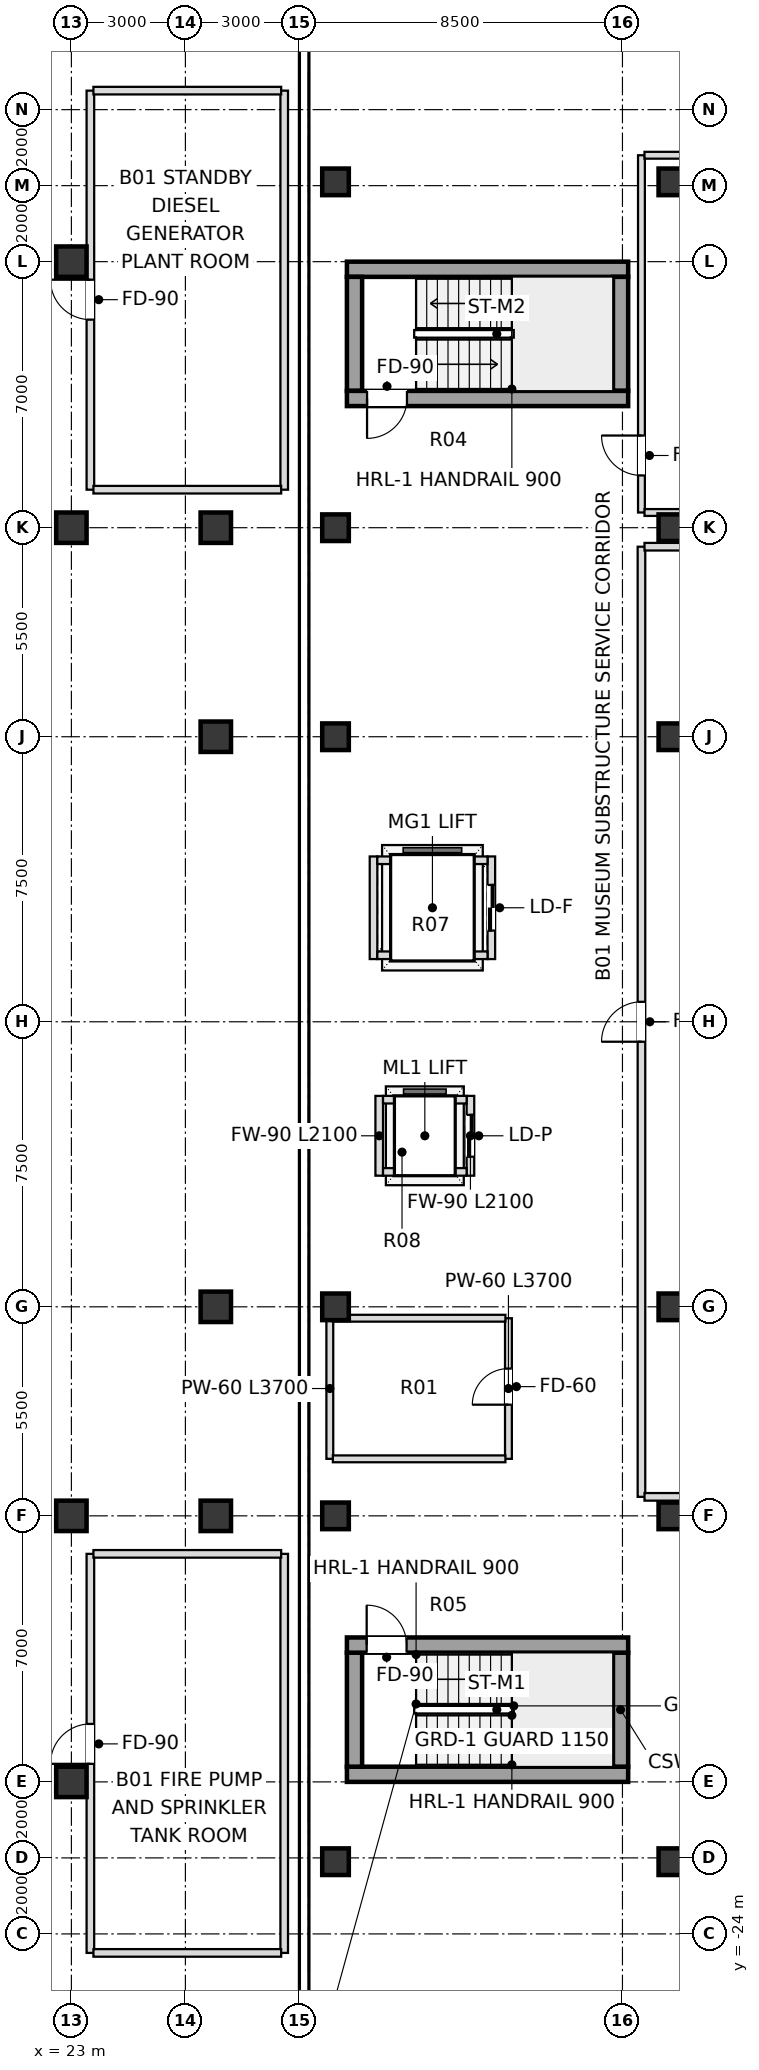
"""IFC4 building model, lengths in metres.
Left out: names, types, materials, properties, quantities, classifications, styles, units other than length and angle.
Written with IfcOpenShell. Run it as: python <this file> out.ifc"""

import sys

from ifc_helpers import new_model, si_unit, direction, frame, frame_2d, origin, origin_2d, place, context, subcontext, project, spatial, rectangle, extrude, element, fill, save


model = new_model("IFC4")
c1 = context("Model", 3, precision=1e-05, world=origin(), true_north=direction((0.0, 1.0)))
c2 = subcontext(c1, "Body", "Model", "MODEL_VIEW")
j1 = project(units=[si_unit("LENGTHUNIT", "METRE"), si_unit("PLANEANGLEUNIT", "RADIAN")], contexts=[c1])
p1 = place(None, origin())
s1 = spatial("IfcSite", under=j1, at=p1, CompositionType="ELEMENT")
p2 = place(p1, origin())
s2 = spatial("IfcBuilding", under=s1, at=p2, CompositionType="ELEMENT")
p3 = place(p2, frame((0.0, 0.0, -3.6)))
s3 = spatial("IfcBuildingStorey", under=s2, at=p3, CompositionType="ELEMENT", Elevation=-3.6)
for number, where, z_axis, x_axis in (
    (1, (23.0, -20.0, 0.0), (0.0, 0.0, 1.0), (1.0, 0.0, 0.0)),
    (2, (23.0, -13.0, 0.0), (0.0, 0.0, 1.0), (1.0, 0.0, 0.0)),
    (3, (23.0, 13.0, 0.0), (0.0, 0.0, 1.0), (1.0, 0.0, 0.0)),
    (4, (23.0, 20.0, 0.0), (0.0, 0.0, 1.0), (1.0, 0.0, 0.0)),
    (5, (26.8, -13.0, 0.0), (0.0, 0.0, 1.0), (1.0, 0.0, 0.0)),
    (6, (26.8, -7.5, 0.0), (0.0, 0.0, 1.0), (1.0, 0.0, 0.0)),
    (7, (26.8, 7.5, 0.0), (0.0, 0.0, 1.0), (1.0, 0.0, 0.0)),
    (8, (26.8, 13.0, 0.0), (0.0, 0.0, 1.0), (1.0, 0.0, 0.0)),
):
    element("IfcColumn", number, at=place(p3, frame(where, z_axis=z_axis, x_axis=x_axis)), inside=s3, PredefinedType="COLUMN", context=c2, shape_type="SweptSolid", body=[
        extrude(rectangle(XDim=0.8, YDim=0.8, at=origin_2d()), origin(), (0.0, 0.0, 1.0), 3.6),
    ])
for number, where, z_axis, x_axis in (
    (9, (29.95, -22.1, 0.0), (0.0, 0.0, 1.0), (1.0, 0.0, 0.0)),
    (10, (29.95, -13.0, 0.0), (0.0, 0.0, 1.0), (1.0, 0.0, 0.0)),
    (11, (29.95, -7.5, 0.0), (0.0, 0.0, 1.0), (1.0, 0.0, 0.0)),
    (12, (29.95, 7.5, 0.0), (0.0, 0.0, 1.0), (1.0, 0.0, 0.0)),
    (13, (29.95, 13.0, 0.0), (0.0, 0.0, 1.0), (1.0, 0.0, 0.0)),
    (14, (29.95, 22.1, 0.0), (0.0, 0.0, 1.0), (1.0, 0.0, 0.0)),
    (15, (38.8, -22.1, 0.0), (0.0, 0.0, 1.0), (1.0, 0.0, 0.0)),
    (16, (38.8, -13.0, 0.0), (0.0, 0.0, 1.0), (1.0, 0.0, 0.0)),
    (17, (38.8, -7.5, 0.0), (0.0, 0.0, 1.0), (1.0, 0.0, 0.0)),
    (18, (38.8, 7.5, 0.0), (0.0, 0.0, 1.0), (1.0, 0.0, 0.0)),
    (19, (38.8, 13.0, 0.0), (0.0, 0.0, 1.0), (1.0, 0.0, 0.0)),
    (20, (38.8, 22.1, 0.0), (0.0, 0.0, 1.0), (1.0, 0.0, 0.0)),
):
    element("IfcColumn", number, at=place(p3, frame(where, z_axis=z_axis, x_axis=x_axis)), inside=s3, PredefinedType="COLUMN", context=c2, shape_type="SweptSolid", body=[
        extrude(rectangle(XDim=0.7, YDim=0.7, at=origin_2d()), origin(), (0.0, 0.0, 1.0), 3.6),
    ])
p4 = place(p3, frame((37.65, -19.8, 0.0), z_axis=(0.0, 0.0, 1.0), x_axis=(-1.0, 0.0, 0.0)))
e21 = element("IfcWall", 21, at=p4, inside=s3, PredefinedType="SHEAR", context=c2, shape_type="SweptSolid", body=[
    extrude(rectangle(XDim=7.4, YDim=0.4, at=frame_2d((3.7, 0.0))), origin(), (0.0, 0.0, 1.0), 3.25),
])
for number, where, z_axis, x_axis in (
    (22, (37.45, -19.6, 0.0), (0.0, 0.0, 1.0), (0.0, 1.0, 0.0)),
    (23, (30.45, -19.6, 0.0), (0.0, 0.0, 1.0), (0.0, 1.0, 0.0)),
):
    element("IfcWall", number, at=place(p3, frame(where, z_axis=z_axis, x_axis=x_axis)), inside=s3, PredefinedType="SHEAR", context=c2, shape_type="SweptSolid", body=[
        extrude(rectangle(XDim=3.0, YDim=0.4, at=frame_2d((1.5, 0.0))), origin(), (0.0, 0.0, 1.0), 3.25),
    ])
p5 = place(p3, frame((30.25, -16.4, 0.0), z_axis=(0.0, 0.0, 1.0), x_axis=(1.0, 0.0, 0.0)))
e24 = element("IfcWall", 24, at=p5, inside=s3, PredefinedType="SHEAR", context=c2, shape_type="SweptSolid", body=[
    extrude(rectangle(XDim=7.4, YDim=0.4, at=frame_2d((3.7, 0.0))), origin(), (0.0, 0.0, 1.0), 3.25),
])
p6 = place(p5, frame((0.52, 0.0, 0.0)))
e25 = element("IfcOpeningElement", 25, at=p6, cuts=e24, PredefinedType="OPENING", context=c2, shape_type="SweptSolid", body=[
    extrude(rectangle(XDim=1.05, YDim=2.15, at=frame_2d((0.525, 1.075))), frame((0.0, 0.21, 0.0), z_axis=(0.0, -1.0, 0.0), x_axis=(1.0, 0.0, 0.0)), (0.0, 0.0, 1.0), 0.42),
])
p7 = place(p3, frame((30.25, 19.8, 0.0), z_axis=(0.0, 0.0, 1.0), x_axis=(1.0, 0.0, 0.0)))
e26 = element("IfcWall", 26, at=p7, inside=s3, PredefinedType="SHEAR", context=c2, shape_type="SweptSolid", body=[
    extrude(rectangle(XDim=7.4, YDim=0.4, at=frame_2d((3.7, 0.0))), origin(), (0.0, 0.0, 1.0), 3.25),
])
for number, where, z_axis, x_axis in (
    (27, (37.45, 16.6, 0.0), (0.0, 0.0, 1.0), (0.0, 1.0, 0.0)),
    (28, (30.45, 16.6, 0.0), (0.0, 0.0, 1.0), (0.0, 1.0, 0.0)),
):
    element("IfcWall", number, at=place(p3, frame(where, z_axis=z_axis, x_axis=x_axis)), inside=s3, PredefinedType="SHEAR", context=c2, shape_type="SweptSolid", body=[
        extrude(rectangle(XDim=3.0, YDim=0.4, at=frame_2d((1.5, 0.0))), origin(), (0.0, 0.0, 1.0), 3.25),
    ])
p8 = place(p3, frame((37.65, 16.4, 0.0), z_axis=(0.0, 0.0, 1.0), x_axis=(-1.0, 0.0, 0.0)))
e29 = element("IfcWall", 29, at=p8, inside=s3, PredefinedType="SHEAR", context=c2, shape_type="SweptSolid", body=[
    extrude(rectangle(XDim=7.4, YDim=0.4, at=frame_2d((3.7, 0.0))), origin(), (0.0, 0.0, 1.0), 3.25),
])
p9 = place(p8, frame((5.82, 0.0, 0.0)))
e30 = element("IfcOpeningElement", 30, at=p9, cuts=e29, PredefinedType="OPENING", context=c2, shape_type="SweptSolid", body=[
    extrude(rectangle(XDim=1.05, YDim=2.15, at=frame_2d((0.525, 1.075))), frame((0.0, 0.21, 0.0), z_axis=(0.0, -1.0, 0.0), x_axis=(1.0, 0.0, 0.0)), (0.0, 0.0, 1.0), 0.42),
])
p10 = place(p3, frame((33.5, -4.05, 0.0), z_axis=(0.0, 0.0, 1.0), x_axis=(0.0, 1.0, 0.0)))
e31 = element("IfcWall", 31, at=p10, inside=s3, PredefinedType="SOLIDWALL", context=c2, shape_type="SweptSolid", body=[
    extrude(rectangle(XDim=2.1, YDim=0.2, at=frame_2d((1.05, 0.0))), origin(), (0.0, 0.0, 1.0), 2.467),
])
p11 = place(p10, frame((0.5, 0.0, 0.0)))
e32 = element("IfcOpeningElement", 32, at=p11, cuts=e31, PredefinedType="OPENING", context=c2, shape_type="SweptSolid", body=[
    extrude(rectangle(XDim=1.1, YDim=2.15, at=frame_2d((0.55, 1.075))), frame((0.0, 0.11, 0.0), z_axis=(0.0, -1.0, 0.0), x_axis=(1.0, 0.0, 0.0)), (0.0, 0.0, 1.0), 0.22),
])
p12 = place(p3, frame((31.1, -4.05, 0.0), z_axis=(0.0, 0.0, 1.0), x_axis=(0.0, 1.0, 0.0)))
e33 = element("IfcWall", 33, at=p12, inside=s3, PredefinedType="SOLIDWALL", context=c2, shape_type="SweptSolid", body=[
    extrude(rectangle(XDim=2.1, YDim=0.2, at=frame_2d((1.05, 0.0))), origin(), (0.0, 0.0, 1.0), 2.467),
])
for number, where, z_axis, x_axis in (
    (34, (31.2, -3.95, 0.0), (0.0, 0.0, 1.0), (1.0, 0.0, 0.0)),
    (35, (31.2, -2.05, 0.0), (0.0, 0.0, 1.0), (1.0, 0.0, 0.0)),
):
    element("IfcWall", number, at=place(p3, frame(where, z_axis=z_axis, x_axis=x_axis)), inside=s3, PredefinedType="SOLIDWALL", context=c2, shape_type="SweptSolid", body=[
        extrude(rectangle(XDim=2.2, YDim=0.2, at=frame_2d((1.1, 0.0))), origin(), (0.0, 0.0, 1.0), 2.467),
    ])
p13 = place(p3, frame((34.05, 1.65, 0.0), z_axis=(0.0, 0.0, 1.0), x_axis=(0.0, 1.0, 0.0)))
e36 = element("IfcWall", 36, at=p13, inside=s3, PredefinedType="SOLIDWALL", context=c2, shape_type="SweptSolid", body=[
    extrude(rectangle(XDim=2.7, YDim=0.2, at=frame_2d((1.35, 0.0))), origin(), (0.0, 0.0, 1.0), 2.467),
])
p14 = place(p13, frame((0.75, 0.0, 0.0)))
e37 = element("IfcOpeningElement", 37, at=p14, cuts=e36, PredefinedType="OPENING", context=c2, shape_type="SweptSolid", body=[
    extrude(rectangle(XDim=1.2, YDim=2.2, at=frame_2d((0.6, 1.1))), frame((0.0, 0.11, 0.0), z_axis=(0.0, -1.0, 0.0), x_axis=(1.0, 0.0, 0.0)), (0.0, 0.0, 1.0), 0.22),
])
p15 = place(p3, frame((30.95, 1.65, 0.0), z_axis=(0.0, 0.0, 1.0), x_axis=(0.0, 1.0, 0.0)))
e38 = element("IfcWall", 38, at=p15, inside=s3, PredefinedType="SOLIDWALL", context=c2, shape_type="SweptSolid", body=[
    extrude(rectangle(XDim=2.7, YDim=0.2, at=frame_2d((1.35, 0.0))), origin(), (0.0, 0.0, 1.0), 2.467),
])
for number, where, z_axis, x_axis in (
    (39, (31.05, 1.75, 0.0), (0.0, 0.0, 1.0), (1.0, 0.0, 0.0)),
    (40, (31.05, 4.25, 0.0), (0.0, 0.0, 1.0), (1.0, 0.0, 0.0)),
):
    element("IfcWall", number, at=place(p3, frame(where, z_axis=z_axis, x_axis=x_axis)), inside=s3, PredefinedType="SOLIDWALL", context=c2, shape_type="SweptSolid", body=[
        extrude(rectangle(XDim=2.9, YDim=0.2, at=frame_2d((1.45, 0.0))), origin(), (0.0, 0.0, 1.0), 2.467),
    ])
p16 = place(p3, frame((23.5, -24.5, 0.0), z_axis=(0.0, 0.0, 1.0), x_axis=(0.0, 1.0, 0.0)))
e41 = element("IfcWall", 41, at=p16, inside=s3, PredefinedType="SOLIDWALL", context=c2, shape_type="SweptSolid", body=[
    extrude(rectangle(XDim=10.5, YDim=0.2, at=frame_2d((5.25, 0.0))), origin(), (0.0, 0.0, 1.0), 3.25),
])
p17 = place(p16, frame((4.975, 0.0, 0.0)))
e42 = element("IfcOpeningElement", 42, at=p17, cuts=e41, PredefinedType="OPENING", context=c2, shape_type="SweptSolid", body=[
    extrude(rectangle(XDim=1.05, YDim=2.15, at=frame_2d((0.525, 1.075))), frame((0.0, 0.11, 0.0), z_axis=(0.0, -1.0, 0.0), x_axis=(1.0, 0.0, 0.0)), (0.0, 0.0, 1.0), 0.22),
])
p18 = place(p3, frame((23.5, 14.0, 0.0), z_axis=(0.0, 0.0, 1.0), x_axis=(0.0, 1.0, 0.0)))
e43 = element("IfcWall", 43, at=p18, inside=s3, PredefinedType="SOLIDWALL", context=c2, shape_type="SweptSolid", body=[
    extrude(rectangle(XDim=10.5, YDim=0.2, at=frame_2d((5.25, 0.0))), origin(), (0.0, 0.0, 1.0), 3.25),
])
p19 = place(p18, frame((4.475, 0.0, 0.0)))
e44 = element("IfcOpeningElement", 44, at=p19, cuts=e43, PredefinedType="OPENING", context=c2, shape_type="SweptSolid", body=[
    extrude(rectangle(XDim=1.05, YDim=2.15, at=frame_2d((0.525, 1.075))), frame((0.0, 0.11, 0.0), z_axis=(0.0, -1.0, 0.0), x_axis=(1.0, 0.0, 0.0)), (0.0, 0.0, 1.0), 0.22),
])
for number, where, z_axis, x_axis in (
    (45, (28.6, -24.5, 0.0), (0.0, 0.0, 1.0), (0.0, 1.0, 0.0)),
    (46, (28.6, 14.0, 0.0), (0.0, 0.0, 1.0), (0.0, 1.0, 0.0)),
):
    element("IfcWall", number, at=place(p3, frame(where, z_axis=z_axis, x_axis=x_axis)), inside=s3, PredefinedType="SOLIDWALL", context=c2, shape_type="SweptSolid", body=[
        extrude(rectangle(XDim=10.5, YDim=0.2, at=frame_2d((5.25, 0.0))), origin(), (0.0, 0.0, 1.0), 3.25),
    ])
p20 = place(p3, frame((29.8, -11.5, 0.0), z_axis=(0.0, 0.0, 1.0), x_axis=(0.0, 1.0, 0.0)))
e47 = element("IfcWall", 47, at=p20, inside=s3, PredefinedType="PARTITIONING", context=c2, shape_type="SweptSolid", body=[
    extrude(rectangle(XDim=3.7, YDim=0.18, at=frame_2d((1.85, 0.0))), origin(), (0.0, 0.0, 1.0), 2.467),
])
p21 = place(p3, frame((34.5, -11.5, 0.0), z_axis=(0.0, 0.0, 1.0), x_axis=(0.0, 1.0, 0.0)))
e48 = element("IfcWall", 48, at=p21, inside=s3, PredefinedType="PARTITIONING", context=c2, shape_type="SweptSolid", body=[
    extrude(rectangle(XDim=3.7, YDim=0.18, at=frame_2d((1.85, 0.0))), origin(), (0.0, 0.0, 1.0), 3.25),
])
p22 = place(p21, frame((1.425, 0.0, 0.0)))
e49 = element("IfcOpeningElement", 49, at=p22, cuts=e48, PredefinedType="OPENING", context=c2, shape_type="SweptSolid", body=[
    extrude(rectangle(XDim=0.95, YDim=2.15, at=frame_2d((0.475, 1.075))), frame((0.0, 0.1, 0.0), z_axis=(0.0, -1.0, 0.0), x_axis=(1.0, 0.0, 0.0)), (0.0, 0.0, 1.0), 0.2),
])
p23 = place(p3, frame((38.0, -12.5, 0.0), z_axis=(0.0, 0.0, 1.0), x_axis=(0.0, 1.0, 0.0)))
e50 = element("IfcWall", 50, at=p23, inside=s3, PredefinedType="SOLIDWALL", context=c2, shape_type="SweptSolid", body=[
    extrude(rectangle(XDim=25.0, YDim=0.2, at=frame_2d((12.5, 0.0))), origin(), (0.0, 0.0, 1.0), 2.467),
])
p24 = place(p23, frame((11.975, 0.0, 0.0)))
e51 = element("IfcOpeningElement", 51, at=p24, cuts=e50, PredefinedType="OPENING", context=c2, shape_type="SweptSolid", body=[
    extrude(rectangle(XDim=1.05, YDim=2.15, at=frame_2d((0.525, 1.075))), frame((0.0, 0.11, 0.0), z_axis=(0.0, -1.0, 0.0), x_axis=(1.0, 0.0, 0.0)), (0.0, 0.0, 1.0), 0.22),
])
p25 = place(p3, frame((38.0, 13.4, 0.0), z_axis=(0.0, 0.0, 1.0), x_axis=(0.0, 1.0, 0.0)))
e52 = element("IfcWall", 52, at=p25, inside=s3, PredefinedType="PARTITIONING", context=c2, shape_type="SweptSolid", body=[
    extrude(rectangle(XDim=9.4, YDim=0.18, at=frame_2d((4.7, 0.0))), origin(), (0.0, 0.0, 1.0), 2.467),
])
p26 = place(p25, frame((0.975, 0.0, 0.0)))
e53 = element("IfcOpeningElement", 53, at=p26, cuts=e52, PredefinedType="OPENING", context=c2, shape_type="SweptSolid", body=[
    extrude(rectangle(XDim=1.05, YDim=2.15, at=frame_2d((0.525, 1.075))), frame((0.0, 0.1, 0.0), z_axis=(0.0, -1.0, 0.0), x_axis=(1.0, 0.0, 0.0)), (0.0, 0.0, 1.0), 0.2),
])
for number, where, z_axis, x_axis in (
    (54, (23.58, -24.5, 0.0), (0.0, 0.0, 1.0), (1.0, 0.0, 0.0)),
    (55, (23.58, -14.0, 0.0), (0.0, 0.0, 1.0), (1.0, 0.0, 0.0)),
):
    element("IfcWall", number, at=place(p3, frame(where, z_axis=z_axis, x_axis=x_axis)), inside=s3, PredefinedType="SOLIDWALL", context=c2, shape_type="SweptSolid", body=[
        extrude(rectangle(XDim=4.94, YDim=0.2, at=frame_2d((2.47, 0.0))), origin(), (0.0, 0.0, 1.0), 3.25),
    ])
p27 = place(p3, frame((38.08, -12.5, 0.0), z_axis=(0.0, 0.0, 1.0), x_axis=(1.0, 0.0, 0.0)))
e56 = element("IfcWall", 56, at=p27, inside=s3, PredefinedType="SOLIDWALL", context=c2, shape_type="SweptSolid", body=[
    extrude(rectangle(XDim=16.84, YDim=0.2, at=frame_2d((8.42, 0.0))), origin(), (0.0, 0.0, 1.0), 2.467),
])
for number, where, z_axis, x_axis in (
    (57, (29.88, -11.5, 0.0), (0.0, 0.0, 1.0), (1.0, 0.0, 0.0)),
    (58, (29.88, -7.8, 0.0), (0.0, 0.0, 1.0), (1.0, 0.0, 0.0)),
):
    element("IfcWall", number, at=place(p3, frame(where, z_axis=z_axis, x_axis=x_axis)), inside=s3, PredefinedType="PARTITIONING", context=c2, shape_type="SweptSolid", body=[
        extrude(rectangle(XDim=4.54, YDim=0.18, at=frame_2d((2.27, 0.0))), origin(), (0.0, 0.0, 1.0), 2.467),
    ])
p28 = place(p3, frame((38.08, 12.5, 0.0), z_axis=(0.0, 0.0, 1.0), x_axis=(1.0, 0.0, 0.0)))
e59 = element("IfcWall", 59, at=p28, inside=s3, PredefinedType="SOLIDWALL", context=c2, shape_type="SweptSolid", body=[
    extrude(rectangle(XDim=16.84, YDim=0.2, at=frame_2d((8.42, 0.0))), origin(), (0.0, 0.0, 1.0), 2.467),
])
p29 = place(p3, frame((38.08, 13.4, 0.0), z_axis=(0.0, 0.0, 1.0), x_axis=(1.0, 0.0, 0.0)))
e60 = element("IfcWall", 60, at=p29, inside=s3, PredefinedType="PARTITIONING", context=c2, shape_type="SweptSolid", body=[
    extrude(rectangle(XDim=16.84, YDim=0.18, at=frame_2d((8.42, 0.0))), origin(), (0.0, 0.0, 1.0), 2.467),
])
p30 = place(p3, frame((23.58, 14.0, 0.0), z_axis=(0.0, 0.0, 1.0), x_axis=(1.0, 0.0, 0.0)))
e61 = element("IfcWall", 61, at=p30, inside=s3, PredefinedType="SOLIDWALL", context=c2, shape_type="SweptSolid", body=[
    extrude(rectangle(XDim=4.94, YDim=0.2, at=frame_2d((2.47, 0.0))), origin(), (0.0, 0.0, 1.0), 3.25),
])
p31 = place(p3, frame((38.08, 22.8, 0.0), z_axis=(0.0, 0.0, 1.0), x_axis=(1.0, 0.0, 0.0)))
e62 = element("IfcWall", 62, at=p31, inside=s3, PredefinedType="PARTITIONING", context=c2, shape_type="SweptSolid", body=[
    extrude(rectangle(XDim=16.84, YDim=0.18, at=frame_2d((8.42, 0.0))), origin(), (0.0, 0.0, 1.0), 3.25),
])
p32 = place(p3, frame((23.58, 24.5, 0.0), z_axis=(0.0, 0.0, 1.0), x_axis=(1.0, 0.0, 0.0)))
e63 = element("IfcWall", 63, at=p32, inside=s3, PredefinedType="SOLIDWALL", context=c2, shape_type="SweptSolid", body=[
    extrude(rectangle(XDim=4.94, YDim=0.2, at=frame_2d((2.47, 0.0))), origin(), (0.0, 0.0, 1.0), 3.25),
])
p33 = place(p6, origin())
e64 = element("IfcDoor", 64, at=p33, inside=s3, OperationType="SINGLE_SWING_LEFT", PredefinedType="DOOR", context=c2, shape_type="SweptSolid", body=[
    extrude(rectangle(XDim=1.05, YDim=2.15, at=frame_2d((0.525, 1.075))), frame((0.0, 0.025, 0.0), z_axis=(0.0, -1.0, 0.0), x_axis=(1.0, 0.0, 0.0)), (0.0, 0.0, 1.0), 0.05),
])
fill(e25, e64)
p34 = place(p9, origin())
e65 = element("IfcDoor", 65, at=p34, inside=s3, OperationType="SINGLE_SWING_RIGHT", PredefinedType="DOOR", context=c2, shape_type="SweptSolid", body=[
    extrude(rectangle(XDim=1.05, YDim=2.15, at=frame_2d((0.525, 1.075))), frame((0.0, 0.025, 0.0), z_axis=(0.0, -1.0, 0.0), x_axis=(1.0, 0.0, 0.0)), (0.0, 0.0, 1.0), 0.05),
])
fill(e30, e65)
p35 = place(p11, origin())
e66 = element("IfcDoor", 66, at=p35, inside=s3, OperationType="DOUBLE_DOOR_SLIDING", PredefinedType="DOOR", context=c2, shape_type="SweptSolid", body=[
    extrude(rectangle(XDim=1.1, YDim=2.15, at=frame_2d((0.55, 1.075))), frame((0.0, 0.025, 0.0), z_axis=(0.0, -1.0, 0.0), x_axis=(1.0, 0.0, 0.0)), (0.0, 0.0, 1.0), 0.05),
])
fill(e32, e66)
p36 = place(p14, origin())
e67 = element("IfcDoor", 67, at=p36, inside=s3, OperationType="DOUBLE_DOOR_SLIDING", PredefinedType="DOOR", context=c2, shape_type="SweptSolid", body=[
    extrude(rectangle(XDim=1.2, YDim=2.2, at=frame_2d((0.6, 1.1))), frame((0.0, 0.025, 0.0), z_axis=(0.0, -1.0, 0.0), x_axis=(1.0, 0.0, 0.0)), (0.0, 0.0, 1.0), 0.05),
])
fill(e37, e67)
p37 = place(p17, origin())
e68 = element("IfcDoor", 68, at=p37, inside=s3, OperationType="SINGLE_SWING_LEFT", PredefinedType="DOOR", context=c2, shape_type="SweptSolid", body=[
    extrude(rectangle(XDim=1.05, YDim=2.15, at=frame_2d((0.525, 1.075))), frame((0.0, 0.025, 0.0), z_axis=(0.0, -1.0, 0.0), x_axis=(1.0, 0.0, 0.0)), (0.0, 0.0, 1.0), 0.05),
])
fill(e42, e68)
p38 = place(p19, origin())
e69 = element("IfcDoor", 69, at=p38, inside=s3, OperationType="SINGLE_SWING_RIGHT", PredefinedType="DOOR", context=c2, shape_type="SweptSolid", body=[
    extrude(rectangle(XDim=1.05, YDim=2.15, at=frame_2d((0.525, 1.075))), frame((0.0, 0.025, 0.0), z_axis=(0.0, -1.0, 0.0), x_axis=(1.0, 0.0, 0.0)), (0.0, 0.0, 1.0), 0.05),
])
fill(e44, e69)
p39 = place(p24, origin())
e70 = element("IfcDoor", 70, at=p39, inside=s3, OperationType="SINGLE_SWING_LEFT", PredefinedType="DOOR", context=c2, shape_type="SweptSolid", body=[
    extrude(rectangle(XDim=1.05, YDim=2.15, at=frame_2d((0.525, 1.075))), frame((0.0, 0.025, 0.0), z_axis=(0.0, -1.0, 0.0), x_axis=(1.0, 0.0, 0.0)), (0.0, 0.0, 1.0), 0.05),
])
fill(e51, e70)
p40 = place(p26, origin())
e71 = element("IfcDoor", 71, at=p40, inside=s3, OperationType="SINGLE_SWING_RIGHT", PredefinedType="DOOR", context=c2, shape_type="SweptSolid", body=[
    extrude(rectangle(XDim=1.05, YDim=2.15, at=frame_2d((0.525, 1.075))), frame((0.0, 0.025, 0.0), z_axis=(0.0, -1.0, 0.0), x_axis=(1.0, 0.0, 0.0)), (0.0, 0.0, 1.0), 0.05),
])
fill(e53, e71)
p41 = place(p22, origin())
e72 = element("IfcDoor", 72, at=p41, inside=s3, OperationType="SINGLE_SWING_LEFT", PredefinedType="DOOR", context=c2, shape_type="SweptSolid", body=[
    extrude(rectangle(XDim=0.95, YDim=2.15, at=frame_2d((0.475, 1.075))), frame((0.0, 0.025, 0.0), z_axis=(0.0, -1.0, 0.0), x_axis=(1.0, 0.0, 0.0)), (0.0, 0.0, 1.0), 0.05),
])
fill(e49, e72)
save(model, sys.argv[1])
